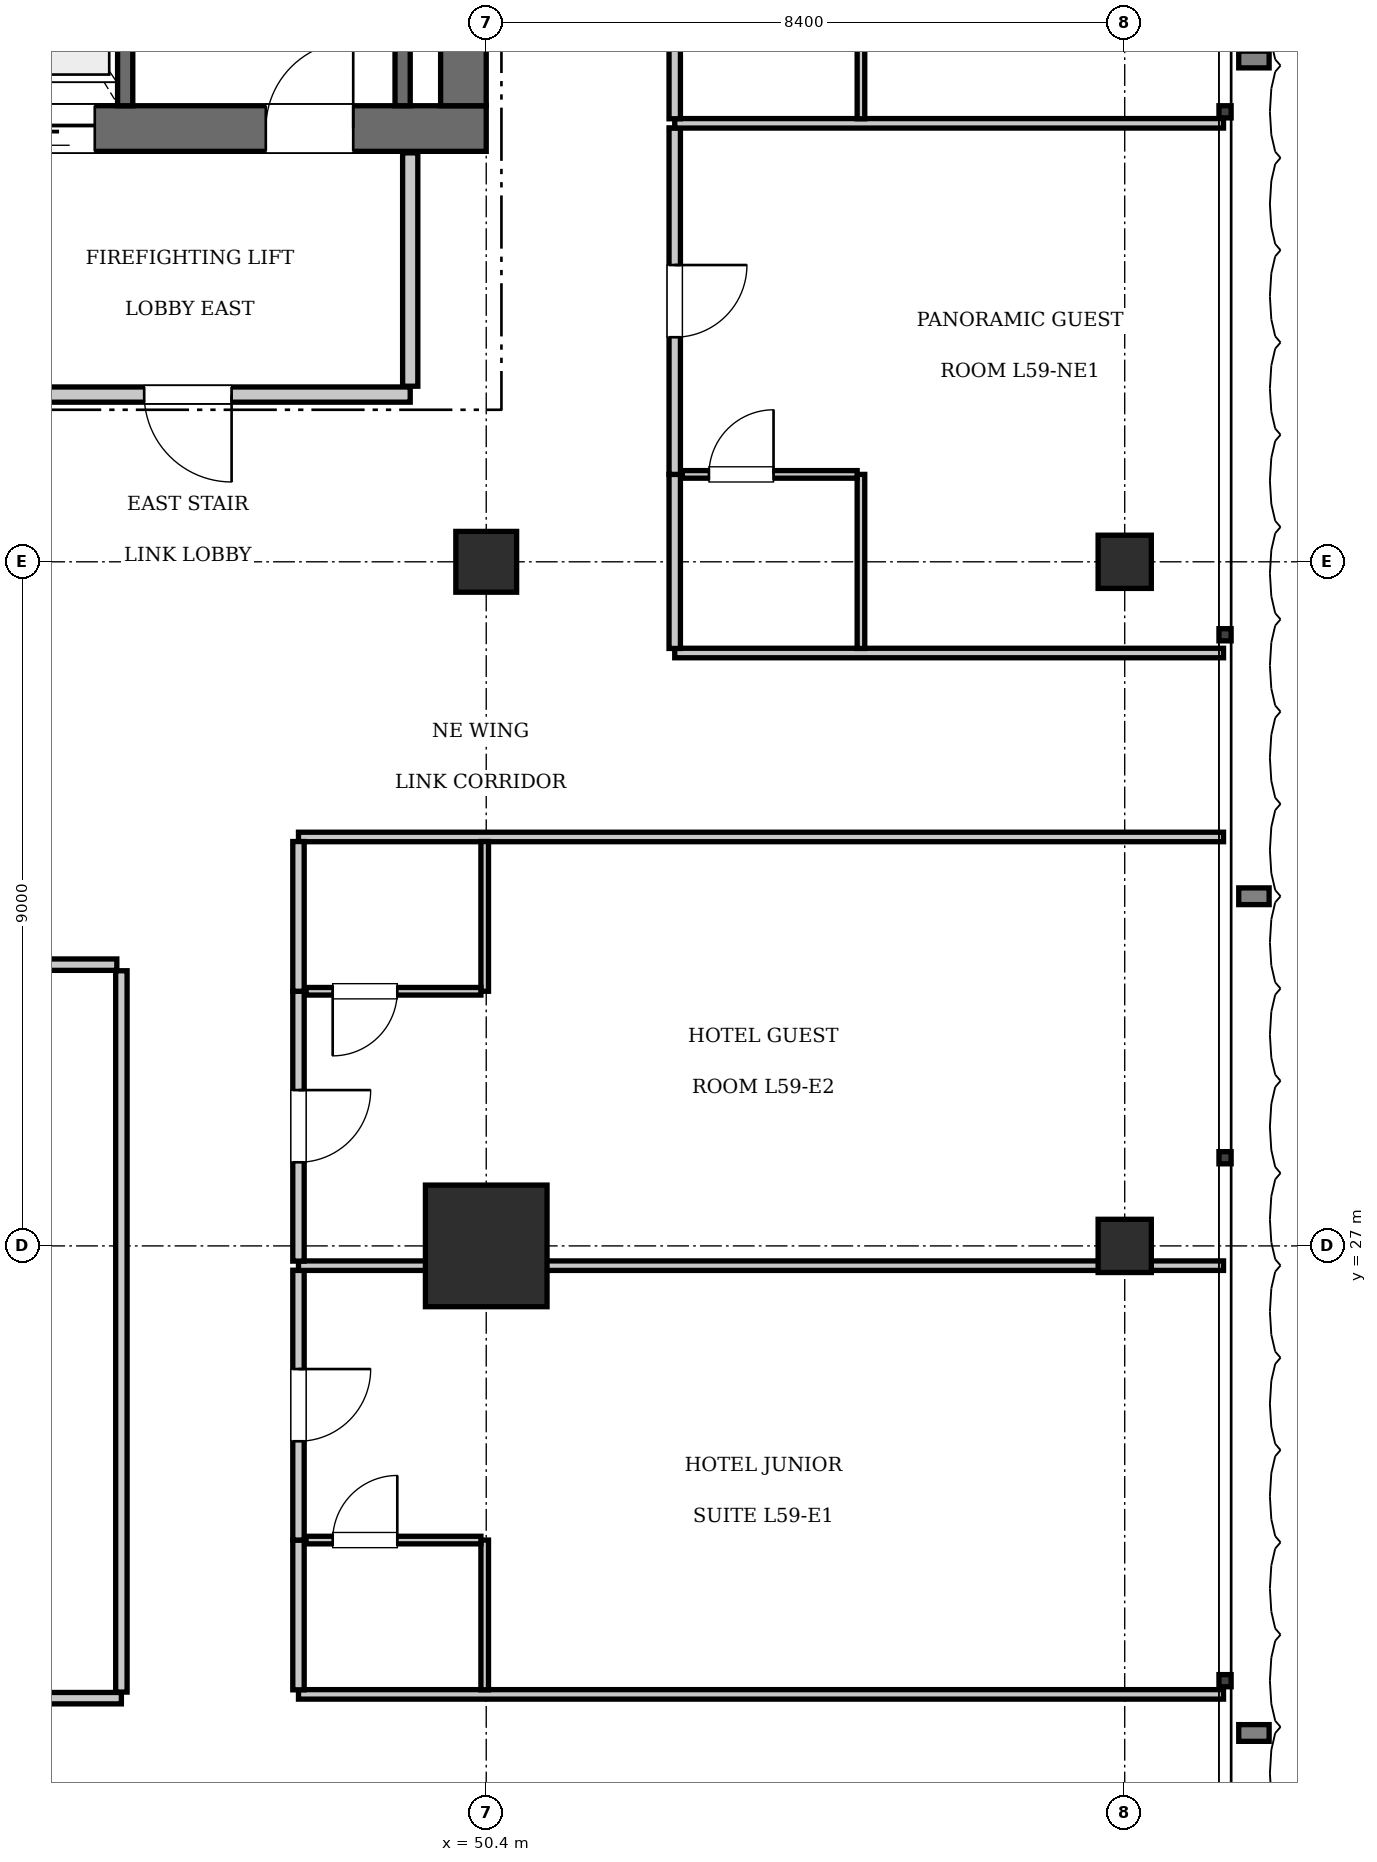
"""IFC4 building model, lengths in metres.
Left out: names, types, materials, properties, quantities, classifications, styles, units other than length and angle.
Written with IfcOpenShell. Run it as: python <this file> out.ifc"""

import sys

from ifc_helpers import new_model, si_unit, direction, frame, frame_2d, origin, origin_2d, place, context, subcontext, project, spatial, rectangle, extrude, element, fill, save


model = new_model("IFC4")
c1 = context("Model", 3, precision=1e-05, world=origin(), true_north=direction((0.0, 1.0)))
c2 = subcontext(c1, "Body", "Model", "MODEL_VIEW")
j1 = project(units=[si_unit("LENGTHUNIT", "METRE"), si_unit("PLANEANGLEUNIT", "RADIAN")], contexts=[c1])
p1 = place(None, origin())
s1 = spatial("IfcSite", under=j1, at=p1, CompositionType="ELEMENT")
p2 = place(p1, origin())
s2 = spatial("IfcBuilding", under=s1, at=p2, CompositionType="ELEMENT")
p3 = place(p2, frame((0.0, 0.0, 243.25)))
s3 = spatial("IfcBuildingStorey", under=s2, at=p3, CompositionType="ELEMENT", Elevation=243.25)
p4 = place(p3, frame((50.4, 27.0, 0.0), z_axis=(0.0, 0.0, 1.0), x_axis=(1.0, 0.0, 0.0)))
e1 = element("IfcColumn", 1, at=p4, inside=s3, PredefinedType="COLUMN", context=c2, shape_type="SweptSolid", body=[
    extrude(rectangle(XDim=1.6, YDim=1.6, at=origin_2d()), origin(), (0.0, 0.0, 1.0), 3.85),
])
p5 = place(p3, frame((43.6, 41.7, 0.0), z_axis=(0.0, 0.0, 1.0), x_axis=(1.0, 0.0, 0.0)))
e2 = element("IfcWall", 2, at=p5, inside=s3, PredefinedType="SHEAR", context=c2, shape_type="SweptSolid", body=[
    extrude(rectangle(XDim=6.8, YDim=0.6, at=frame_2d((3.4, 0.0))), origin(), (0.0, 0.0, 1.0), 3.85),
])
p6 = place(p5, frame((3.9, 0.0, 0.0)))
e3 = element("IfcOpeningElement", 3, at=p6, cuts=e2, PredefinedType="OPENING", context=c2, shape_type="SweptSolid", body=[
    extrude(rectangle(XDim=1.15, YDim=2.15, at=frame_2d((0.575, 1.075))), frame((0.0, 0.31, 0.0), z_axis=(0.0, -1.0, 0.0), x_axis=(1.0, 0.0, 0.0)), (0.0, 0.0, 1.0), 0.62),
])
p7 = place(p5, frame((0.55, 0.0, 0.0)))
e4 = element("IfcOpeningElement", 4, at=p7, cuts=e2, PredefinedType="OPENING", context=c2, shape_type="SweptSolid", body=[
    extrude(rectangle(XDim=1.1, YDim=2.2, at=frame_2d((0.55, 1.1))), frame((0.0, 0.31, 0.0), z_axis=(0.0, -1.0, 0.0), x_axis=(1.0, 0.0, 0.0)), (0.0, 0.0, 1.0), 0.62),
])
p8 = place(p3, frame((50.1, 42.0, 0.0), z_axis=(0.0, 0.0, 1.0), x_axis=(0.0, 1.0, 0.0)))
e5 = element("IfcWall", 5, at=p8, inside=s3, PredefinedType="SHEAR", context=c2, shape_type="SweptSolid", body=[
    extrude(rectangle(XDim=2.2, YDim=0.6, at=frame_2d((1.1, 0.0))), origin(), (0.0, 0.0, 1.0), 3.85),
])
p9 = place(p3, frame((50.4, 36.0, 0.0), z_axis=(0.0, 0.0, 1.0), x_axis=(1.0, 0.0, 0.0)))
e6 = element("IfcColumn", 6, at=p9, inside=s3, PredefinedType="COLUMN", context=c2, shape_type="SweptSolid", body=[
    extrude(rectangle(XDim=0.8, YDim=0.8, at=origin_2d()), origin(), (0.0, 0.0, 1.0), 3.85),
])
for number, where, z_axis, x_axis in (
    (7, (58.8, 27.0, 0.0), (0.0, 0.0, 1.0), (1.0, 0.0, 0.0)),
    (8, (58.8, 36.0, 0.0), (0.0, 0.0, 1.0), (1.0, 0.0, 0.0)),
):
    element("IfcColumn", number, at=place(p3, frame(where, z_axis=z_axis, x_axis=x_axis)), inside=s3, PredefinedType="COLUMN", context=c2, shape_type="SweptSolid", body=[
        extrude(rectangle(XDim=0.7, YDim=0.7, at=origin_2d()), origin(), (0.0, 0.0, 1.0), 3.85),
    ])
p10 = place(p3, frame((45.65, 42.0, 0.0), z_axis=(0.0, 0.0, 1.0), x_axis=(0.0, 1.0, 0.0)))
e9 = element("IfcWall", 9, at=p10, inside=s3, PredefinedType="SOLIDWALL", context=c2, shape_type="SweptSolid", body=[
    extrude(rectangle(XDim=9.15, YDim=0.2, at=frame_2d((4.575, 0.0))), origin(), (0.0, 0.0, 1.0), 3.61),
])
p11 = place(p3, frame((49.3, 42.0, 0.0), z_axis=(0.0, 0.0, 1.0), x_axis=(0.0, 1.0, 0.0)))
e10 = element("IfcWall", 10, at=p11, inside=s3, PredefinedType="SOLIDWALL", context=c2, shape_type="SweptSolid", body=[
    extrude(rectangle(XDim=9.12, YDim=0.2, at=frame_2d((4.56, 0.0))), origin(), (0.0, 0.0, 1.0), 3.61),
])
p12 = place(p3, frame((43.6, 38.2, 0.0), z_axis=(0.0, 0.0, 1.0), x_axis=(1.0, 0.0, 0.0)))
e11 = element("IfcWall", 11, at=p12, inside=s3, PredefinedType="PARTITIONING", context=c2, shape_type="SweptSolid", body=[
    extrude(rectangle(XDim=5.8, YDim=0.2, at=frame_2d((2.9, 0.0))), origin(), (0.0, 0.0, 1.0), 3.61),
])
p13 = place(p12, frame((2.3, 0.0, 0.0)))
e12 = element("IfcOpeningElement", 12, at=p13, cuts=e11, PredefinedType="OPENING", context=c2, shape_type="SweptSolid", body=[
    extrude(rectangle(XDim=1.15, YDim=2.15, at=frame_2d((0.575, 1.075))), frame((0.0, 0.11, 0.0), z_axis=(0.0, -1.0, 0.0), x_axis=(1.0, 0.0, 0.0)), (0.0, 0.0, 1.0), 0.22),
])
p14 = place(p3, frame((49.4, 38.31, 0.0), z_axis=(0.0, 0.0, 1.0), x_axis=(0.0, 1.0, 0.0)))
e13 = element("IfcWall", 13, at=p14, inside=s3, PredefinedType="PARTITIONING", context=c2, shape_type="SweptSolid", body=[
    extrude(rectangle(XDim=3.07, YDim=0.2, at=frame_2d((1.535, 0.0))), origin(), (0.0, 0.0, 1.0), 3.61),
])
p15 = place(p3, frame((30.05, 21.05, 0.0), z_axis=(0.0, 0.0, 1.0), x_axis=(1.0, 0.0, 0.0)))
e14 = element("IfcWall", 14, at=p15, inside=s3, PredefinedType="PARTITIONING", context=c2, shape_type="SweptSolid", body=[
    extrude(rectangle(XDim=15.55, YDim=0.15, at=frame_2d((7.775, 0.0))), origin(), (0.0, 0.0, 1.0), 3.61),
])
p16 = place(p3, frame((45.6, 21.13, 0.0), z_axis=(0.0, 0.0, 1.0), x_axis=(0.0, 1.0, 0.0)))
e15 = element("IfcWall", 15, at=p16, inside=s3, PredefinedType="PARTITIONING", context=c2, shape_type="SweptSolid", body=[
    extrude(rectangle(XDim=9.49, YDim=0.15, at=frame_2d((4.745, 0.0))), origin(), (0.0, 0.0, 1.0), 3.61),
])
p17 = place(p3, frame((35.833, 30.7, 0.0), z_axis=(0.0, 0.0, 1.0), x_axis=(1.0, 0.0, 0.0)))
e16 = element("IfcWall", 16, at=p17, inside=s3, PredefinedType="PARTITIONING", context=c2, shape_type="SweptSolid", body=[
    extrude(rectangle(XDim=9.707, YDim=0.15, at=frame_2d((4.853, 0.0))), origin(), (0.0, 0.0, 1.0), 3.61),
])
p18 = place(p17, frame((4.403, 0.0, 0.0)))
e17 = element("IfcOpeningElement", 17, at=p18, cuts=e16, PredefinedType="OPENING", context=c2, shape_type="SweptSolid", body=[
    extrude(rectangle(XDim=0.9, YDim=2.1, at=frame_2d((0.45, 1.05))), frame((0.0, 0.085, 0.0), z_axis=(0.0, -1.0, 0.0), x_axis=(1.0, 0.0, 0.0)), (0.0, 0.0, 1.0), 0.17),
])
for number, where, z_axis, x_axis in (
    (18, (47.93, 21.1, 0.0), (0.0, 0.0, 1.0), (1.0, 0.0, 0.0)),
    (19, (47.93, 32.38, 0.0), (0.0, 0.0, 1.0), (1.0, 0.0, 0.0)),
):
    element("IfcWall", number, at=place(p3, frame(where, z_axis=z_axis, x_axis=x_axis)), inside=s3, PredefinedType="PARTITIONING", context=c2, shape_type="SweptSolid", body=[
        extrude(rectangle(XDim=12.17, YDim=0.125, at=frame_2d((6.085, 0.0))), origin(), (0.0, 0.0, 1.0), 3.61),
    ])
p19 = place(p3, frame((47.93, 21.16, 0.0), z_axis=(0.0, 0.0, 1.0), x_axis=(0.0, 1.0, 0.0)))
e20 = element("IfcWall", 20, at=p19, inside=s3, PredefinedType="PARTITIONING", context=c2, shape_type="SweptSolid", body=[
    extrude(rectangle(XDim=1.97, YDim=0.15, at=frame_2d((0.985, 0.0))), origin(), (0.0, 0.0, 1.0), 3.61),
])
p20 = place(p3, frame((47.93, 23.13, 0.0), z_axis=(0.0, 0.0, 1.0), x_axis=(0.0, 1.0, 0.0)))
e21 = element("IfcWall", 21, at=p20, inside=s3, PredefinedType="PARTITIONING", context=c2, shape_type="SweptSolid", body=[
    extrude(rectangle(XDim=3.55, YDim=0.15, at=frame_2d((1.775, 0.0))), origin(), (0.0, 0.0, 1.0), 3.61),
])
p21 = place(p20, frame((1.3, 0.0, 0.0)))
e22 = element("IfcOpeningElement", 22, at=p21, cuts=e21, PredefinedType="OPENING", context=c2, shape_type="SweptSolid", body=[
    extrude(rectangle(XDim=0.95, YDim=2.15, at=frame_2d((0.475, 1.075))), frame((0.0, 0.085, 0.0), z_axis=(0.0, -1.0, 0.0), x_axis=(1.0, 0.0, 0.0)), (0.0, 0.0, 1.0), 0.17),
])
p22 = place(p3, frame((50.38, 21.16, 0.0), z_axis=(0.0, 0.0, 1.0), x_axis=(0.0, 1.0, 0.0)))
e23 = element("IfcWall", 23, at=p22, inside=s3, PredefinedType="PARTITIONING", context=c2, shape_type="SweptSolid", body=[
    extrude(rectangle(XDim=1.97, YDim=0.1, at=frame_2d((0.985, 0.0))), origin(), (0.0, 0.0, 1.0), 3.077),
])
p23 = place(p3, frame((48.03, 23.13, 0.0), z_axis=(0.0, 0.0, 1.0), x_axis=(1.0, 0.0, 0.0)))
e24 = element("IfcWall", 24, at=p23, inside=s3, PredefinedType="PARTITIONING", context=c2, shape_type="SweptSolid", body=[
    extrude(rectangle(XDim=2.3, YDim=0.1, at=frame_2d((1.15, 0.0))), origin(), (0.0, 0.0, 1.0), 3.61),
])
p24 = place(p23, frame((0.35, 0.0, 0.0)))
e25 = element("IfcOpeningElement", 25, at=p24, cuts=e24, PredefinedType="OPENING", context=c2, shape_type="SweptSolid", body=[
    extrude(rectangle(XDim=0.85, YDim=2.1, at=frame_2d((0.425, 1.05))), frame((0.0, 0.06, 0.0), z_axis=(0.0, -1.0, 0.0), x_axis=(1.0, 0.0, 0.0)), (0.0, 0.0, 1.0), 0.12),
])
p25 = place(p3, frame((47.93, 26.74, 0.0), z_axis=(0.0, 0.0, 1.0), x_axis=(1.0, 0.0, 0.0)))
e26 = element("IfcWall", 26, at=p25, inside=s3, PredefinedType="PARTITIONING", context=c2, shape_type="SweptSolid", body=[
    extrude(rectangle(XDim=12.17, YDim=0.125, at=frame_2d((6.085, 0.0))), origin(), (0.0, 0.0, 1.0), 2.41),
])
p26 = place(p3, frame((47.93, 26.8, 0.0), z_axis=(0.0, 0.0, 1.0), x_axis=(0.0, 1.0, 0.0)))
e27 = element("IfcWall", 27, at=p26, inside=s3, PredefinedType="PARTITIONING", context=c2, shape_type="SweptSolid", body=[
    extrude(rectangle(XDim=3.55, YDim=0.15, at=frame_2d((1.775, 0.0))), origin(), (0.0, 0.0, 1.0), 3.61),
])
p27 = place(p26, frame((1.3, 0.0, 0.0)))
e28 = element("IfcOpeningElement", 28, at=p27, cuts=e27, PredefinedType="OPENING", context=c2, shape_type="SweptSolid", body=[
    extrude(rectangle(XDim=0.95, YDim=2.15, at=frame_2d((0.475, 1.075))), frame((0.0, 0.085, 0.0), z_axis=(0.0, -1.0, 0.0), x_axis=(1.0, 0.0, 0.0)), (0.0, 0.0, 1.0), 0.17),
])
p28 = place(p3, frame((47.93, 30.35, 0.0), z_axis=(0.0, 0.0, 1.0), x_axis=(0.0, 1.0, 0.0)))
e29 = element("IfcWall", 29, at=p28, inside=s3, PredefinedType="PARTITIONING", context=c2, shape_type="SweptSolid", body=[
    extrude(rectangle(XDim=1.97, YDim=0.15, at=frame_2d((0.985, 0.0))), origin(), (0.0, 0.0, 1.0), 3.61),
])
p29 = place(p3, frame((50.38, 30.35, 0.0), z_axis=(0.0, 0.0, 1.0), x_axis=(0.0, 1.0, 0.0)))
e30 = element("IfcWall", 30, at=p29, inside=s3, PredefinedType="PARTITIONING", context=c2, shape_type="SweptSolid", body=[
    extrude(rectangle(XDim=1.97, YDim=0.1, at=frame_2d((0.985, 0.0))), origin(), (0.0, 0.0, 1.0), 3.077),
])
p30 = place(p3, frame((48.03, 30.35, 0.0), z_axis=(0.0, 0.0, 1.0), x_axis=(1.0, 0.0, 0.0)))
e31 = element("IfcWall", 31, at=p30, inside=s3, PredefinedType="PARTITIONING", context=c2, shape_type="SweptSolid", body=[
    extrude(rectangle(XDim=2.3, YDim=0.1, at=frame_2d((1.15, 0.0))), origin(), (0.0, 0.0, 1.0), 3.61),
])
p31 = place(p30, frame((0.35, 0.0, 0.0)))
e32 = element("IfcOpeningElement", 32, at=p31, cuts=e31, PredefinedType="OPENING", context=c2, shape_type="SweptSolid", body=[
    extrude(rectangle(XDim=0.85, YDim=2.1, at=frame_2d((0.425, 1.05))), frame((0.0, 0.06, 0.0), z_axis=(0.0, -1.0, 0.0), x_axis=(1.0, 0.0, 0.0)), (0.0, 0.0, 1.0), 0.12),
])
p32 = place(p3, frame((52.88, 34.8, 0.0), z_axis=(0.0, 0.0, 1.0), x_axis=(1.0, 0.0, 0.0)))
e33 = element("IfcWall", 33, at=p32, inside=s3, PredefinedType="PARTITIONING", context=c2, shape_type="SweptSolid", body=[
    extrude(rectangle(XDim=7.22, YDim=0.125, at=frame_2d((3.61, 0.0))), origin(), (0.0, 0.0, 1.0), 3.61),
])
p33 = place(p3, frame((52.88, 34.86, 0.0), z_axis=(0.0, 0.0, 1.0), x_axis=(0.0, 1.0, 0.0)))
e34 = element("IfcWall", 34, at=p33, inside=s3, PredefinedType="PARTITIONING", context=c2, shape_type="SweptSolid", body=[
    extrude(rectangle(XDim=2.29, YDim=0.15, at=frame_2d((1.145, 0.0))), origin(), (0.0, 0.0, 1.0), 3.61),
])
p34 = place(p3, frame((52.88, 37.15, 0.0), z_axis=(0.0, 0.0, 1.0), x_axis=(0.0, 1.0, 0.0)))
e35 = element("IfcWall", 35, at=p34, inside=s3, PredefinedType="PARTITIONING", context=c2, shape_type="SweptSolid", body=[
    extrude(rectangle(XDim=4.559, YDim=0.15, at=frame_2d((2.279, 0.0))), origin(), (0.0, 0.0, 1.0), 3.61),
])
p35 = place(p34, frame((1.804, 0.0, 0.0)))
e36 = element("IfcOpeningElement", 36, at=p35, cuts=e35, PredefinedType="OPENING", context=c2, shape_type="SweptSolid", body=[
    extrude(rectangle(XDim=0.95, YDim=2.15, at=frame_2d((0.475, 1.075))), frame((0.0, 0.085, 0.0), z_axis=(0.0, -1.0, 0.0), x_axis=(1.0, 0.0, 0.0)), (0.0, 0.0, 1.0), 0.17),
])
p36 = place(p3, frame((55.33, 34.86, 0.0), z_axis=(0.0, 0.0, 1.0), x_axis=(0.0, 1.0, 0.0)))
e37 = element("IfcWall", 37, at=p36, inside=s3, PredefinedType="PARTITIONING", context=c2, shape_type="SweptSolid", body=[
    extrude(rectangle(XDim=2.29, YDim=0.1, at=frame_2d((1.145, 0.0))), origin(), (0.0, 0.0, 1.0), 3.61),
])
p37 = place(p3, frame((52.98, 37.15, 0.0), z_axis=(0.0, 0.0, 1.0), x_axis=(1.0, 0.0, 0.0)))
e38 = element("IfcWall", 38, at=p37, inside=s3, PredefinedType="PARTITIONING", context=c2, shape_type="SweptSolid", body=[
    extrude(rectangle(XDim=2.3, YDim=0.1, at=frame_2d((1.15, 0.0))), origin(), (0.0, 0.0, 1.0), 3.61),
])
p38 = place(p37, frame((0.35, 0.0, 0.0)))
e39 = element("IfcOpeningElement", 39, at=p38, cuts=e38, PredefinedType="OPENING", context=c2, shape_type="SweptSolid", body=[
    extrude(rectangle(XDim=0.85, YDim=2.1, at=frame_2d((0.425, 1.05))), frame((0.0, 0.06, 0.0), z_axis=(0.0, -1.0, 0.0), x_axis=(1.0, 0.0, 0.0)), (0.0, 0.0, 1.0), 0.12),
])
p39 = place(p3, frame((52.88, 41.769, 0.0), z_axis=(0.0, 0.0, 1.0), x_axis=(1.0, 0.0, 0.0)))
e40 = element("IfcWall", 40, at=p39, inside=s3, PredefinedType="PARTITIONING", context=c2, shape_type="SweptSolid", body=[
    extrude(rectangle(XDim=7.22, YDim=0.125, at=frame_2d((3.61, 0.0))), origin(), (0.0, 0.0, 1.0), 3.61),
])
p40 = place(p3, frame((52.88, 41.829, 0.0), z_axis=(0.0, 0.0, 1.0), x_axis=(0.0, 1.0, 0.0)))
e41 = element("IfcWall", 41, at=p40, inside=s3, PredefinedType="PARTITIONING", context=c2, shape_type="SweptSolid", body=[
    extrude(rectangle(XDim=2.29, YDim=0.15, at=frame_2d((1.145, 0.0))), origin(), (0.0, 0.0, 1.0), 3.61),
])
p41 = place(p3, frame((55.33, 41.829, 0.0), z_axis=(0.0, 0.0, 1.0), x_axis=(0.0, 1.0, 0.0)))
e42 = element("IfcWall", 42, at=p41, inside=s3, PredefinedType="PARTITIONING", context=c2, shape_type="SweptSolid", body=[
    extrude(rectangle(XDim=2.29, YDim=0.1, at=frame_2d((1.145, 0.0))), origin(), (0.0, 0.0, 1.0), 3.61),
])
p42 = place(p6, origin())
e43 = element("IfcDoor", 43, at=p42, inside=s3, OperationType="SINGLE_SWING_RIGHT", PredefinedType="DOOR", context=c2, shape_type="SweptSolid", body=[
    extrude(rectangle(XDim=1.15, YDim=2.15, at=frame_2d((0.575, 1.075))), frame((0.0, 0.025, 0.0), z_axis=(0.0, -1.0, 0.0), x_axis=(1.0, 0.0, 0.0)), (0.0, 0.0, 1.0), 0.05),
])
fill(e3, e43)
p43 = place(p7, frame((1.1, 0.0, 0.0), z_axis=(0.0, 0.0, 1.0), x_axis=(-1.0, 0.0, 0.0)))
e44 = element("IfcDoor", 44, at=p43, inside=s3, OperationType="SLIDING_TO_LEFT", PredefinedType="DOOR", context=c2, shape_type="SweptSolid", body=[
    extrude(rectangle(XDim=1.1, YDim=2.2, at=frame_2d((0.55, 1.1))), frame((0.0, 0.025, 0.0), z_axis=(0.0, -1.0, 0.0), x_axis=(1.0, 0.0, 0.0)), (0.0, 0.0, 1.0), 0.05),
])
fill(e4, e44)
p44 = place(p13, frame((1.15, 0.0, 0.0), z_axis=(0.0, 0.0, 1.0), x_axis=(-1.0, 0.0, 0.0)))
e45 = element("IfcDoor", 45, at=p44, inside=s3, OperationType="SINGLE_SWING_LEFT", PredefinedType="DOOR", context=c2, shape_type="SweptSolid", body=[
    extrude(rectangle(XDim=1.15, YDim=2.15, at=frame_2d((0.575, 1.075))), frame((0.0, 0.025, 0.0), z_axis=(0.0, -1.0, 0.0), x_axis=(1.0, 0.0, 0.0)), (0.0, 0.0, 1.0), 0.05),
])
fill(e12, e45)
p45 = place(p24, origin())
e46 = element("IfcDoor", 46, at=p45, inside=s3, OperationType="SINGLE_SWING_RIGHT", PredefinedType="DOOR", context=c2, shape_type="SweptSolid", body=[
    extrude(rectangle(XDim=0.85, YDim=2.1, at=frame_2d((0.425, 1.05))), frame((0.0, 0.025, 0.0), z_axis=(0.0, -1.0, 0.0), x_axis=(1.0, 0.0, 0.0)), (0.0, 0.0, 1.0), 0.05),
])
fill(e25, e46)
p46 = place(p21, frame((0.95, 0.0, 0.0), z_axis=(0.0, 0.0, 1.0), x_axis=(-1.0, 0.0, 0.0)))
e47 = element("IfcDoor", 47, at=p46, inside=s3, OperationType="SINGLE_SWING_LEFT", PredefinedType="DOOR", context=c2, shape_type="SweptSolid", body=[
    extrude(rectangle(XDim=0.95, YDim=2.15, at=frame_2d((0.475, 1.075))), frame((0.0, 0.025, 0.0), z_axis=(0.0, -1.0, 0.0), x_axis=(1.0, 0.0, 0.0)), (0.0, 0.0, 1.0), 0.05),
])
fill(e22, e47)
p47 = place(p31, frame((0.85, 0.0, 0.0), z_axis=(0.0, 0.0, 1.0), x_axis=(-1.0, 0.0, 0.0)))
e48 = element("IfcDoor", 48, at=p47, inside=s3, OperationType="SINGLE_SWING_RIGHT", PredefinedType="DOOR", context=c2, shape_type="SweptSolid", body=[
    extrude(rectangle(XDim=0.85, YDim=2.1, at=frame_2d((0.425, 1.05))), frame((0.0, 0.025, 0.0), z_axis=(0.0, -1.0, 0.0), x_axis=(1.0, 0.0, 0.0)), (0.0, 0.0, 1.0), 0.05),
])
fill(e32, e48)
p48 = place(p27, frame((0.95, 0.0, 0.0), z_axis=(0.0, 0.0, 1.0), x_axis=(-1.0, 0.0, 0.0)))
e49 = element("IfcDoor", 49, at=p48, inside=s3, OperationType="SINGLE_SWING_LEFT", PredefinedType="DOOR", context=c2, shape_type="SweptSolid", body=[
    extrude(rectangle(XDim=0.95, YDim=2.15, at=frame_2d((0.475, 1.075))), frame((0.0, 0.025, 0.0), z_axis=(0.0, -1.0, 0.0), x_axis=(1.0, 0.0, 0.0)), (0.0, 0.0, 1.0), 0.05),
])
fill(e28, e49)
p49 = place(p38, origin())
e50 = element("IfcDoor", 50, at=p49, inside=s3, OperationType="SINGLE_SWING_RIGHT", PredefinedType="DOOR", context=c2, shape_type="SweptSolid", body=[
    extrude(rectangle(XDim=0.85, YDim=2.1, at=frame_2d((0.425, 1.05))), frame((0.0, 0.025, 0.0), z_axis=(0.0, -1.0, 0.0), x_axis=(1.0, 0.0, 0.0)), (0.0, 0.0, 1.0), 0.05),
])
fill(e39, e50)
p50 = place(p35, frame((0.95, 0.0, 0.0), z_axis=(0.0, 0.0, 1.0), x_axis=(-1.0, 0.0, 0.0)))
e51 = element("IfcDoor", 51, at=p50, inside=s3, OperationType="SINGLE_SWING_LEFT", PredefinedType="DOOR", context=c2, shape_type="SweptSolid", body=[
    extrude(rectangle(XDim=0.95, YDim=2.15, at=frame_2d((0.475, 1.075))), frame((0.0, 0.025, 0.0), z_axis=(0.0, -1.0, 0.0), x_axis=(1.0, 0.0, 0.0)), (0.0, 0.0, 1.0), 0.05),
])
fill(e36, e51)
save(model, sys.argv[1])
